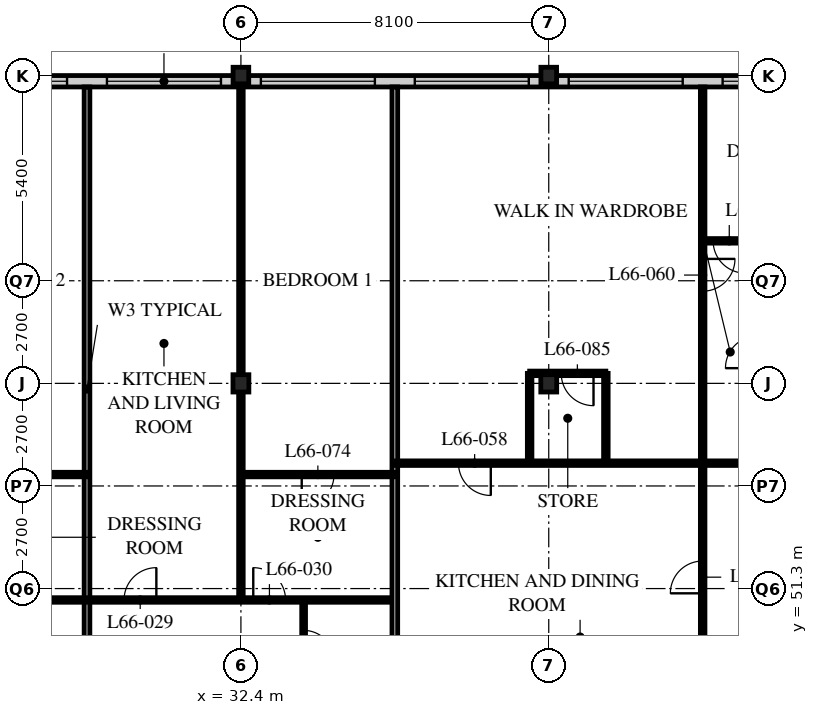
"""IFC4 building model, lengths in metres.
Left out: names, types, materials, properties, quantities, classifications, styles, units other than length and angle.
Written with IfcOpenShell. Run it as: python <this file> out.ifc"""

import sys

from ifc_helpers import new_model, si_unit, direction, frame, frame_2d, origin, origin_2d, place, context, subcontext, project, spatial, rectangle, i_section, extrude, element, fill, save


model = new_model("IFC4")
c1 = context("Model", 3, precision=1e-05, world=origin(), true_north=direction((0.0, 1.0)))
c2 = subcontext(c1, "Body", "Model", "MODEL_VIEW")
j1 = project(units=[si_unit("LENGTHUNIT", "METRE"), si_unit("PLANEANGLEUNIT", "RADIAN")], contexts=[c1])
p1 = place(None, origin())
s1 = spatial("IfcSite", under=j1, at=p1, CompositionType="ELEMENT")
p2 = place(p1, origin())
s2 = spatial("IfcBuilding", under=s1, at=p2, CompositionType="ELEMENT")
p3 = place(p2, frame((0.0, 0.0, 258.0)))
s3 = spatial("IfcBuildingStorey", under=s2, at=p3, CompositionType="ELEMENT", Elevation=258.0)
p4 = place(p3, frame((32.4, 56.7, 0.0), z_axis=(0.0, 0.0, 1.0), x_axis=(1.0, 0.0, 0.0)))
e1 = element("IfcColumn", 1, at=p4, inside=s3, PredefinedType="COLUMN", context=c2, shape_type="SweptSolid", body=[
    extrude(i_section(OverallWidth=0.418, OverallDepth=0.456, WebThickness=0.042, FlangeThickness=0.067, FilletRadius=0.015, at=origin_2d()), origin(), (0.0, 0.0, 1.0), 3.9),
])
p5 = place(p3, frame((32.4, 64.8, 0.0), z_axis=(0.0, 0.0, 1.0), x_axis=(1.0, 0.0, 0.0)))
e2 = element("IfcColumn", 2, at=p5, inside=s3, PredefinedType="COLUMN", context=c2, shape_type="SweptSolid", body=[
    extrude(i_section(OverallWidth=0.412, OverallDepth=0.437, WebThickness=0.036, FlangeThickness=0.058, FilletRadius=0.015, at=origin_2d()), origin(), (0.0, 0.0, 1.0), 3.9),
])
p6 = place(p3, frame((40.5, 56.7, 0.0), z_axis=(0.0, 0.0, 1.0), x_axis=(1.0, 0.0, 0.0)))
e3 = element("IfcColumn", 3, at=p6, inside=s3, PredefinedType="COLUMN", context=c2, shape_type="SweptSolid", body=[
    extrude(i_section(OverallWidth=0.418, OverallDepth=0.456, WebThickness=0.042, FlangeThickness=0.067, FilletRadius=0.015, at=origin_2d()), origin(), (0.0, 0.0, 1.0), 3.9),
])
p7 = place(p3, frame((40.5, 64.8, 0.0), z_axis=(0.0, 0.0, 1.0), x_axis=(1.0, 0.0, 0.0)))
e4 = element("IfcColumn", 4, at=p7, inside=s3, PredefinedType="COLUMN", context=c2, shape_type="SweptSolid", body=[
    extrude(i_section(OverallWidth=0.412, OverallDepth=0.437, WebThickness=0.036, FlangeThickness=0.058, FilletRadius=0.015, at=origin_2d()), origin(), (0.0, 0.0, 1.0), 3.9),
])
p8 = place(p3, frame((48.3, 64.65, 0.0), z_axis=(0.0, 0.0, 1.0), x_axis=(-1.0, 0.0, 0.0)))
e5 = element("IfcWall", 5, at=p8, inside=s3, PredefinedType="SOLIDWALL", context=c2, shape_type="SweptSolid", body=[
    extrude(rectangle(XDim=40.2, YDim=0.3, at=frame_2d((20.1, 0.0))), origin(), (0.0, 0.0, 1.0), 3.69),
])
p9 = place(p8, frame((0.225, 0.0, 0.6)))
e6 = element("IfcOpeningElement", 6, at=p9, cuts=e5, PredefinedType="OPENING", context=c2, shape_type="SweptSolid", body=[
    extrude(rectangle(XDim=3.0, YDim=2.4, at=frame_2d((1.5, 1.2))), frame((0.0, 0.16, 0.0), z_axis=(0.0, -1.0, 0.0), x_axis=(1.0, 0.0, 0.0)), (0.0, 0.0, 1.0), 0.32),
])
p10 = place(p8, frame((4.275, 0.0, 0.6)))
e7 = element("IfcOpeningElement", 7, at=p10, cuts=e5, PredefinedType="OPENING", context=c2, shape_type="SweptSolid", body=[
    extrude(rectangle(XDim=3.0, YDim=2.4, at=frame_2d((1.5, 1.2))), frame((0.0, 0.16, 0.0), z_axis=(0.0, -1.0, 0.0), x_axis=(1.0, 0.0, 0.0)), (0.0, 0.0, 1.0), 0.32),
])
p11 = place(p8, frame((8.325, 0.0, 0.6)))
e8 = element("IfcOpeningElement", 8, at=p11, cuts=e5, PredefinedType="OPENING", context=c2, shape_type="SweptSolid", body=[
    extrude(rectangle(XDim=3.0, YDim=2.4, at=frame_2d((1.5, 1.2))), frame((0.0, 0.16, 0.0), z_axis=(0.0, -1.0, 0.0), x_axis=(1.0, 0.0, 0.0)), (0.0, 0.0, 1.0), 0.32),
])
p12 = place(p8, frame((12.375, 0.0, 0.6)))
e9 = element("IfcOpeningElement", 9, at=p12, cuts=e5, PredefinedType="OPENING", context=c2, shape_type="SweptSolid", body=[
    extrude(rectangle(XDim=3.0, YDim=2.4, at=frame_2d((1.5, 1.2))), frame((0.0, 0.16, 0.0), z_axis=(0.0, -1.0, 0.0), x_axis=(1.0, 0.0, 0.0)), (0.0, 0.0, 1.0), 0.32),
])
p13 = place(p8, frame((16.425, 0.0, 0.6)))
e10 = element("IfcOpeningElement", 10, at=p13, cuts=e5, PredefinedType="OPENING", context=c2, shape_type="SweptSolid", body=[
    extrude(rectangle(XDim=3.0, YDim=2.4, at=frame_2d((1.5, 1.2))), frame((0.0, 0.16, 0.0), z_axis=(0.0, -1.0, 0.0), x_axis=(1.0, 0.0, 0.0)), (0.0, 0.0, 1.0), 0.32),
])
p14 = place(p8, frame((20.475, 0.0, 0.6)))
e11 = element("IfcOpeningElement", 11, at=p14, cuts=e5, PredefinedType="OPENING", context=c2, shape_type="SweptSolid", body=[
    extrude(rectangle(XDim=3.0, YDim=2.4, at=frame_2d((1.5, 1.2))), frame((0.0, 0.16, 0.0), z_axis=(0.0, -1.0, 0.0), x_axis=(1.0, 0.0, 0.0)), (0.0, 0.0, 1.0), 0.32),
])
p15 = place(p8, frame((24.525, 0.0, 0.6)))
e12 = element("IfcOpeningElement", 12, at=p15, cuts=e5, PredefinedType="OPENING", context=c2, shape_type="SweptSolid", body=[
    extrude(rectangle(XDim=3.0, YDim=2.4, at=frame_2d((1.5, 1.2))), frame((0.0, 0.16, 0.0), z_axis=(0.0, -1.0, 0.0), x_axis=(1.0, 0.0, 0.0)), (0.0, 0.0, 1.0), 0.32),
])
p16 = place(p8, frame((28.575, 0.0, 0.6)))
e13 = element("IfcOpeningElement", 13, at=p16, cuts=e5, PredefinedType="OPENING", context=c2, shape_type="SweptSolid", body=[
    extrude(rectangle(XDim=3.0, YDim=2.4, at=frame_2d((1.5, 1.2))), frame((0.0, 0.16, 0.0), z_axis=(0.0, -1.0, 0.0), x_axis=(1.0, 0.0, 0.0)), (0.0, 0.0, 1.0), 0.32),
])
p17 = place(p8, frame((32.625, 0.0, 0.6)))
e14 = element("IfcOpeningElement", 14, at=p17, cuts=e5, PredefinedType="OPENING", context=c2, shape_type="SweptSolid", body=[
    extrude(rectangle(XDim=3.0, YDim=2.4, at=frame_2d((1.5, 1.2))), frame((0.0, 0.16, 0.0), z_axis=(0.0, -1.0, 0.0), x_axis=(1.0, 0.0, 0.0)), (0.0, 0.0, 1.0), 0.32),
])
p18 = place(p8, frame((36.675, 0.0, 0.6)))
e15 = element("IfcOpeningElement", 15, at=p18, cuts=e5, PredefinedType="OPENING", context=c2, shape_type="SweptSolid", body=[
    extrude(rectangle(XDim=3.0, YDim=2.4, at=frame_2d((1.5, 1.2))), frame((0.0, 0.16, 0.0), z_axis=(0.0, -1.0, 0.0), x_axis=(1.0, 0.0, 0.0)), (0.0, 0.0, 1.0), 0.32),
])
p19 = place(p3, frame((28.35, 48.6, 0.0), z_axis=(0.0, 0.0, 1.0), x_axis=(0.0, 1.0, 0.0)))
e16 = element("IfcWall", 16, at=p19, inside=s3, PredefinedType="PARTITIONING", context=c2, shape_type="SweptSolid", body=[
    extrude(rectangle(XDim=15.9, YDim=0.15, at=frame_2d((7.95, 0.0))), origin(), (0.0, 0.0, 1.0), 3.69),
])
p20 = place(p3, frame((34.05, 48.6, 0.0), z_axis=(0.0, 0.0, 1.0), x_axis=(0.0, 1.0, 0.0)))
e17 = element("IfcWall", 17, at=p20, inside=s3, PredefinedType="PARTITIONING", context=c2, shape_type="SweptSolid", body=[
    extrude(rectangle(XDim=2.4, YDim=0.1, at=frame_2d((1.2, 0.0))), origin(), (0.0, 0.0, 1.0), 3.69),
])
p21 = place(p20, frame((0.8, 0.0, 0.0)))
e18 = element("IfcOpeningElement", 18, at=p21, cuts=e17, PredefinedType="OPENING", context=c2, shape_type="SweptSolid", body=[
    extrude(rectangle(XDim=0.8, YDim=2.1, at=frame_2d((0.4, 1.05))), frame((0.0, 0.06, 0.0), z_axis=(0.0, -1.0, 0.0), x_axis=(1.0, 0.0, 0.0)), (0.0, 0.0, 1.0), 0.12),
])
p22 = place(p3, frame((32.4, 51.0, 0.0), z_axis=(0.0, 0.0, 1.0), x_axis=(0.0, 1.0, 0.0)))
e19 = element("IfcWall", 19, at=p22, inside=s3, PredefinedType="PARTITIONING", context=c2, shape_type="SweptSolid", body=[
    extrude(rectangle(XDim=13.5, YDim=0.12, at=frame_2d((6.75, 0.0))), origin(), (0.0, 0.0, 1.0), 3.078),
])
p23 = place(p3, frame((4.1, 51.0, 0.0), z_axis=(0.0, 0.0, 1.0), x_axis=(1.0, 0.0, 0.0)))
e20 = element("IfcWall", 20, at=p23, inside=s3, PredefinedType="PARTITIONING", context=c2, shape_type="SweptSolid", body=[
    extrude(rectangle(XDim=32.35, YDim=0.12, at=frame_2d((16.175, 0.0))), origin(), (0.0, 0.0, 1.0), 3.69),
])
p24 = place(p23, frame((9.025, 0.0, 0.0)))
e21 = element("IfcOpeningElement", 21, at=p24, cuts=e20, PredefinedType="OPENING", context=c2, shape_type="SweptSolid", body=[
    extrude(rectangle(XDim=0.85, YDim=2.1, at=frame_2d((0.425, 1.05))), frame((0.0, 0.07, 0.0), z_axis=(0.0, -1.0, 0.0), x_axis=(1.0, 0.0, 0.0)), (0.0, 0.0, 1.0), 0.14),
])
p25 = place(p23, frame((16.475, 0.0, 0.0)))
e22 = element("IfcOpeningElement", 22, at=p25, cuts=e20, PredefinedType="OPENING", context=c2, shape_type="SweptSolid", body=[
    extrude(rectangle(XDim=0.85, YDim=2.1, at=frame_2d((0.425, 1.05))), frame((0.0, 0.07, 0.0), z_axis=(0.0, -1.0, 0.0), x_axis=(1.0, 0.0, 0.0)), (0.0, 0.0, 1.0), 0.14),
])
p26 = place(p23, frame((20.525, 0.0, 0.0)))
e23 = element("IfcOpeningElement", 23, at=p26, cuts=e20, PredefinedType="OPENING", context=c2, shape_type="SweptSolid", body=[
    extrude(rectangle(XDim=0.85, YDim=2.1, at=frame_2d((0.425, 1.05))), frame((0.0, 0.07, 0.0), z_axis=(0.0, -1.0, 0.0), x_axis=(1.0, 0.0, 0.0)), (0.0, 0.0, 1.0), 0.14),
])
p27 = place(p23, frame((25.225, 0.0, 0.0)))
e24 = element("IfcOpeningElement", 24, at=p27, cuts=e20, PredefinedType="OPENING", context=c2, shape_type="SweptSolid", body=[
    extrude(rectangle(XDim=0.85, YDim=2.1, at=frame_2d((0.425, 1.05))), frame((0.0, 0.07, 0.0), z_axis=(0.0, -1.0, 0.0), x_axis=(1.0, 0.0, 0.0)), (0.0, 0.0, 1.0), 0.14),
])
p28 = place(p23, frame((28.625, 0.0, 0.0)))
e25 = element("IfcOpeningElement", 25, at=p28, cuts=e20, PredefinedType="OPENING", context=c2, shape_type="SweptSolid", body=[
    extrude(rectangle(XDim=0.85, YDim=2.1, at=frame_2d((0.425, 1.05))), frame((0.0, 0.07, 0.0), z_axis=(0.0, -1.0, 0.0), x_axis=(1.0, 0.0, 0.0)), (0.0, 0.0, 1.0), 0.14),
])
p29 = place(p23, frame((6.725, 0.0, 0.0)))
e26 = element("IfcOpeningElement", 26, at=p29, cuts=e20, PredefinedType="OPENING", context=c2, shape_type="SweptSolid", body=[
    extrude(rectangle(XDim=0.85, YDim=2.1, at=frame_2d((0.425, 1.05))), frame((0.0, 0.07, 0.0), z_axis=(0.0, -1.0, 0.0), x_axis=(1.0, 0.0, 0.0)), (0.0, 0.0, 1.0), 0.14),
])
p30 = place(p23, frame((2.875, 0.0, 0.0)))
e27 = element("IfcOpeningElement", 27, at=p30, cuts=e20, PredefinedType="OPENING", context=c2, shape_type="SweptSolid", body=[
    extrude(rectangle(XDim=0.85, YDim=2.1, at=frame_2d((0.425, 1.05))), frame((0.0, 0.07, 0.0), z_axis=(0.0, -1.0, 0.0), x_axis=(1.0, 0.0, 0.0)), (0.0, 0.0, 1.0), 0.14),
])
p31 = place(p3, frame((36.45, 64.5, 0.0), z_axis=(0.0, 0.0, 1.0), x_axis=(0.0, -1.0, 0.0)))
e28 = element("IfcWall", 28, at=p31, inside=s3, PredefinedType="PARTITIONING", context=c2, shape_type="SweptSolid", body=[
    extrude(rectangle(XDim=15.9, YDim=0.15, at=frame_2d((7.95, 0.0))), origin(), (0.0, 0.0, 1.0), 3.69),
])
p32 = place(p3, frame((36.45, 54.6, 0.0), z_axis=(0.0, 0.0, 1.0), x_axis=(1.0, 0.0, 0.0)))
e29 = element("IfcWall", 29, at=p32, inside=s3, PredefinedType="PARTITIONING", context=c2, shape_type="SweptSolid", body=[
    extrude(rectangle(XDim=19.95, YDim=0.12, at=frame_2d((9.975, 0.0))), origin(), (0.0, 0.0, 1.0), 3.69),
])
p33 = place(p32, frame((1.675, 0.0, 0.0)))
e30 = element("IfcOpeningElement", 30, at=p33, cuts=e29, PredefinedType="OPENING", context=c2, shape_type="SweptSolid", body=[
    extrude(rectangle(XDim=0.85, YDim=2.1, at=frame_2d((0.425, 1.05))), frame((0.0, 0.07, 0.0), z_axis=(0.0, -1.0, 0.0), x_axis=(1.0, 0.0, 0.0)), (0.0, 0.0, 1.0), 0.14),
])
p34 = place(p3, frame((44.55, 64.5, 0.0), z_axis=(0.0, 0.0, 1.0), x_axis=(0.0, -1.0, 0.0)))
e31 = element("IfcWall", 31, at=p34, inside=s3, PredefinedType="PARTITIONING", context=c2, shape_type="SweptSolid", body=[
    extrude(rectangle(XDim=17.7, YDim=0.12, at=frame_2d((8.85, 0.0))), origin(), (0.0, 0.0, 1.0), 3.69),
])
p35 = place(p34, frame((12.475, 0.0, 0.0)))
e32 = element("IfcOpeningElement", 32, at=p35, cuts=e31, PredefinedType="OPENING", context=c2, shape_type="SweptSolid", body=[
    extrude(rectangle(XDim=0.85, YDim=2.1, at=frame_2d((0.425, 1.05))), frame((0.0, 0.07, 0.0), z_axis=(0.0, -1.0, 0.0), x_axis=(1.0, 0.0, 0.0)), (0.0, 0.0, 1.0), 0.14),
])
p36 = place(p34, frame((4.525, 0.0, 0.0)))
e33 = element("IfcOpeningElement", 33, at=p36, cuts=e31, PredefinedType="OPENING", context=c2, shape_type="SweptSolid", body=[
    extrude(rectangle(XDim=0.85, YDim=2.1, at=frame_2d((0.425, 1.05))), frame((0.0, 0.07, 0.0), z_axis=(0.0, -1.0, 0.0), x_axis=(1.0, 0.0, 0.0)), (0.0, 0.0, 1.0), 0.14),
])
p37 = place(p3, frame((48.31, 60.45, 0.0), z_axis=(0.0, 0.0, 1.0), x_axis=(-1.0, 0.0, 0.0)))
e34 = element("IfcWall", 34, at=p37, inside=s3, PredefinedType="PARTITIONING", context=c2, shape_type="SweptSolid", body=[
    extrude(rectangle(XDim=3.76, YDim=0.12, at=frame_2d((1.88, 0.0))), origin(), (0.0, 0.0, 1.0), 3.69),
])
p38 = place(p37, frame((2.635, 0.0, 0.0)))
e35 = element("IfcOpeningElement", 35, at=p38, cuts=e34, PredefinedType="OPENING", context=c2, shape_type="SweptSolid", body=[
    extrude(rectangle(XDim=0.85, YDim=2.1, at=frame_2d((0.425, 1.05))), frame((0.0, 0.07, 0.0), z_axis=(0.0, -1.0, 0.0), x_axis=(1.0, 0.0, 0.0)), (0.0, 0.0, 1.0), 0.14),
])
p39 = place(p3, frame((24.3, 54.3, 0.0), z_axis=(0.0, 0.0, 1.0), x_axis=(1.0, 0.0, 0.0)))
e36 = element("IfcWall", 36, at=p39, inside=s3, PredefinedType="PARTITIONING", context=c2, shape_type="SweptSolid", body=[
    extrude(rectangle(XDim=4.05, YDim=0.12, at=frame_2d((2.025, 0.0))), origin(), (0.0, 0.0, 1.0), 3.69),
])
p40 = place(p39, frame((1.6, 0.0, 0.0)))
e37 = element("IfcOpeningElement", 37, at=p40, cuts=e36, PredefinedType="OPENING", context=c2, shape_type="SweptSolid", body=[
    extrude(rectangle(XDim=0.85, YDim=2.1, at=frame_2d((0.425, 1.05))), frame((0.0, 0.07, 0.0), z_axis=(0.0, -1.0, 0.0), x_axis=(1.0, 0.0, 0.0)), (0.0, 0.0, 1.0), 0.14),
])
p41 = place(p3, frame((32.4, 54.3, 0.0), z_axis=(0.0, 0.0, 1.0), x_axis=(1.0, 0.0, 0.0)))
e38 = element("IfcWall", 38, at=p41, inside=s3, PredefinedType="PARTITIONING", context=c2, shape_type="SweptSolid", body=[
    extrude(rectangle(XDim=4.05, YDim=0.12, at=frame_2d((2.025, 0.0))), origin(), (0.0, 0.0, 1.0), 3.69),
])
p42 = place(p41, frame((1.6, 0.0, 0.0)))
e39 = element("IfcOpeningElement", 39, at=p42, cuts=e38, PredefinedType="OPENING", context=c2, shape_type="SweptSolid", body=[
    extrude(rectangle(XDim=0.85, YDim=2.1, at=frame_2d((0.425, 1.05))), frame((0.0, 0.07, 0.0), z_axis=(0.0, -1.0, 0.0), x_axis=(1.0, 0.0, 0.0)), (0.0, 0.0, 1.0), 0.14),
])
for number, where, z_axis, x_axis in (
    (40, (39.997, 54.6, 0.0), (0.0, 0.0, 1.0), (0.0, 1.0, 0.0)),
    (41, (42.003, 54.6, 0.0), (0.0, 0.0, 1.0), (0.0, 1.0, 0.0)),
):
    element("IfcWall", number, at=place(p3, frame(where, z_axis=z_axis, x_axis=x_axis)), inside=s3, PredefinedType="PARTITIONING", context=c2, shape_type="SweptSolid", body=[
        extrude(rectangle(XDim=2.363, YDim=0.12, at=frame_2d((1.181, 0.0))), origin(), (0.0, 0.0, 1.0), 3.69),
    ])
p43 = place(p3, frame((39.997, 56.963, 0.0), z_axis=(0.0, 0.0, 1.0), x_axis=(1.0, 0.0, 0.0)))
e42 = element("IfcWall", 42, at=p43, inside=s3, PredefinedType="PARTITIONING", context=c2, shape_type="SweptSolid", body=[
    extrude(rectangle(XDim=2.006, YDim=0.12, at=frame_2d((1.003, 0.0))), origin(), (0.0, 0.0, 1.0), 3.69),
])
p44 = place(p43, frame((0.831, 0.0, 0.0)))
e43 = element("IfcOpeningElement", 43, at=p44, cuts=e42, PredefinedType="OPENING", context=c2, shape_type="SweptSolid", body=[
    extrude(rectangle(XDim=0.85, YDim=2.1, at=frame_2d((0.425, 1.05))), frame((0.0, 0.07, 0.0), z_axis=(0.0, -1.0, 0.0), x_axis=(1.0, 0.0, 0.0)), (0.0, 0.0, 1.0), 0.14),
])
p45 = place(p9, origin())
e44 = element("IfcWindow", 44, at=p45, inside=s3, PartitioningType="SINGLE_PANEL", PredefinedType="WINDOW", context=c2, shape_type="SweptSolid", body=[
    extrude(rectangle(XDim=3.0, YDim=2.4, at=frame_2d((1.5, 1.2))), frame((0.0, 0.03, 0.0), z_axis=(0.0, -1.0, 0.0), x_axis=(1.0, 0.0, 0.0)), (0.0, 0.0, 1.0), 0.06),
])
fill(e6, e44)
p46 = place(p10, origin())
e45 = element("IfcWindow", 45, at=p46, inside=s3, PartitioningType="SINGLE_PANEL", PredefinedType="WINDOW", context=c2, shape_type="SweptSolid", body=[
    extrude(rectangle(XDim=3.0, YDim=2.4, at=frame_2d((1.5, 1.2))), frame((0.0, 0.03, 0.0), z_axis=(0.0, -1.0, 0.0), x_axis=(1.0, 0.0, 0.0)), (0.0, 0.0, 1.0), 0.06),
])
fill(e7, e45)
p47 = place(p11, origin())
e46 = element("IfcWindow", 46, at=p47, inside=s3, PartitioningType="SINGLE_PANEL", PredefinedType="WINDOW", context=c2, shape_type="SweptSolid", body=[
    extrude(rectangle(XDim=3.0, YDim=2.4, at=frame_2d((1.5, 1.2))), frame((0.0, 0.03, 0.0), z_axis=(0.0, -1.0, 0.0), x_axis=(1.0, 0.0, 0.0)), (0.0, 0.0, 1.0), 0.06),
])
fill(e8, e46)
p48 = place(p12, origin())
e47 = element("IfcWindow", 47, at=p48, inside=s3, PartitioningType="SINGLE_PANEL", PredefinedType="WINDOW", context=c2, shape_type="SweptSolid", body=[
    extrude(rectangle(XDim=3.0, YDim=2.4, at=frame_2d((1.5, 1.2))), frame((0.0, 0.03, 0.0), z_axis=(0.0, -1.0, 0.0), x_axis=(1.0, 0.0, 0.0)), (0.0, 0.0, 1.0), 0.06),
])
fill(e9, e47)
p49 = place(p13, origin())
e48 = element("IfcWindow", 48, at=p49, inside=s3, PartitioningType="SINGLE_PANEL", PredefinedType="WINDOW", context=c2, shape_type="SweptSolid", body=[
    extrude(rectangle(XDim=3.0, YDim=2.4, at=frame_2d((1.5, 1.2))), frame((0.0, 0.03, 0.0), z_axis=(0.0, -1.0, 0.0), x_axis=(1.0, 0.0, 0.0)), (0.0, 0.0, 1.0), 0.06),
])
fill(e10, e48)
p50 = place(p14, origin())
e49 = element("IfcWindow", 49, at=p50, inside=s3, PartitioningType="SINGLE_PANEL", PredefinedType="WINDOW", context=c2, shape_type="SweptSolid", body=[
    extrude(rectangle(XDim=3.0, YDim=2.4, at=frame_2d((1.5, 1.2))), frame((0.0, 0.03, 0.0), z_axis=(0.0, -1.0, 0.0), x_axis=(1.0, 0.0, 0.0)), (0.0, 0.0, 1.0), 0.06),
])
fill(e11, e49)
p51 = place(p21, origin())
e50 = element("IfcDoor", 50, at=p51, inside=s3, OperationType="SINGLE_SWING_RIGHT", PredefinedType="DOOR", context=c2, shape_type="SweptSolid", body=[
    extrude(rectangle(XDim=0.8, YDim=2.1, at=frame_2d((0.4, 1.05))), frame((0.0, 0.025, 0.0), z_axis=(0.0, -1.0, 0.0), x_axis=(1.0, 0.0, 0.0)), (0.0, 0.0, 1.0), 0.05),
])
fill(e18, e50)
p52 = place(p27, origin())
e51 = element("IfcDoor", 51, at=p52, inside=s3, OperationType="SINGLE_SWING_RIGHT", PredefinedType="DOOR", context=c2, shape_type="SweptSolid", body=[
    extrude(rectangle(XDim=0.85, YDim=2.1, at=frame_2d((0.425, 1.05))), frame((0.0, 0.025, 0.0), z_axis=(0.0, -1.0, 0.0), x_axis=(1.0, 0.0, 0.0)), (0.0, 0.0, 1.0), 0.05),
])
fill(e24, e51)
p53 = place(p28, origin())
e52 = element("IfcDoor", 52, at=p53, inside=s3, OperationType="SINGLE_SWING_LEFT", PredefinedType="DOOR", context=c2, shape_type="SweptSolid", body=[
    extrude(rectangle(XDim=0.85, YDim=2.1, at=frame_2d((0.425, 1.05))), frame((0.0, 0.025, 0.0), z_axis=(0.0, -1.0, 0.0), x_axis=(1.0, 0.0, 0.0)), (0.0, 0.0, 1.0), 0.05),
])
fill(e25, e52)
p54 = place(p33, origin())
e53 = element("IfcDoor", 53, at=p54, inside=s3, OperationType="SINGLE_SWING_LEFT", PredefinedType="DOOR", context=c2, shape_type="SweptSolid", body=[
    extrude(rectangle(XDim=0.85, YDim=2.1, at=frame_2d((0.425, 1.05))), frame((0.0, 0.025, 0.0), z_axis=(0.0, -1.0, 0.0), x_axis=(1.0, 0.0, 0.0)), (0.0, 0.0, 1.0), 0.05),
])
fill(e30, e53)
p55 = place(p35, origin())
e54 = element("IfcDoor", 54, at=p55, inside=s3, OperationType="SINGLE_SWING_LEFT", PredefinedType="DOOR", context=c2, shape_type="SweptSolid", body=[
    extrude(rectangle(XDim=0.85, YDim=2.1, at=frame_2d((0.425, 1.05))), frame((0.0, 0.025, 0.0), z_axis=(0.0, -1.0, 0.0), x_axis=(1.0, 0.0, 0.0)), (0.0, 0.0, 1.0), 0.05),
])
fill(e32, e54)
p56 = place(p36, origin())
e55 = element("IfcDoor", 55, at=p56, inside=s3, OperationType="SINGLE_SWING_LEFT", PredefinedType="DOOR", context=c2, shape_type="SweptSolid", body=[
    extrude(rectangle(XDim=0.85, YDim=2.1, at=frame_2d((0.425, 1.05))), frame((0.0, 0.025, 0.0), z_axis=(0.0, -1.0, 0.0), x_axis=(1.0, 0.0, 0.0)), (0.0, 0.0, 1.0), 0.05),
])
fill(e33, e55)
p57 = place(p38, origin())
e56 = element("IfcDoor", 56, at=p57, inside=s3, OperationType="SINGLE_SWING_LEFT", PredefinedType="DOOR", context=c2, shape_type="SweptSolid", body=[
    extrude(rectangle(XDim=0.85, YDim=2.1, at=frame_2d((0.425, 1.05))), frame((0.0, 0.025, 0.0), z_axis=(0.0, -1.0, 0.0), x_axis=(1.0, 0.0, 0.0)), (0.0, 0.0, 1.0), 0.05),
])
fill(e35, e56)
p58 = place(p42, origin())
e57 = element("IfcDoor", 57, at=p58, inside=s3, OperationType="SINGLE_SWING_RIGHT", PredefinedType="DOOR", context=c2, shape_type="SweptSolid", body=[
    extrude(rectangle(XDim=0.85, YDim=2.1, at=frame_2d((0.425, 1.05))), frame((0.0, 0.025, 0.0), z_axis=(0.0, -1.0, 0.0), x_axis=(1.0, 0.0, 0.0)), (0.0, 0.0, 1.0), 0.05),
])
fill(e39, e57)
p59 = place(p44, origin())
e58 = element("IfcDoor", 58, at=p59, inside=s3, OperationType="SINGLE_SWING_LEFT", PredefinedType="DOOR", context=c2, shape_type="SweptSolid", body=[
    extrude(rectangle(XDim=0.85, YDim=2.1, at=frame_2d((0.425, 1.05))), frame((0.0, 0.025, 0.0), z_axis=(0.0, -1.0, 0.0), x_axis=(1.0, 0.0, 0.0)), (0.0, 0.0, 1.0), 0.05),
])
fill(e43, e58)
save(model, sys.argv[1])
